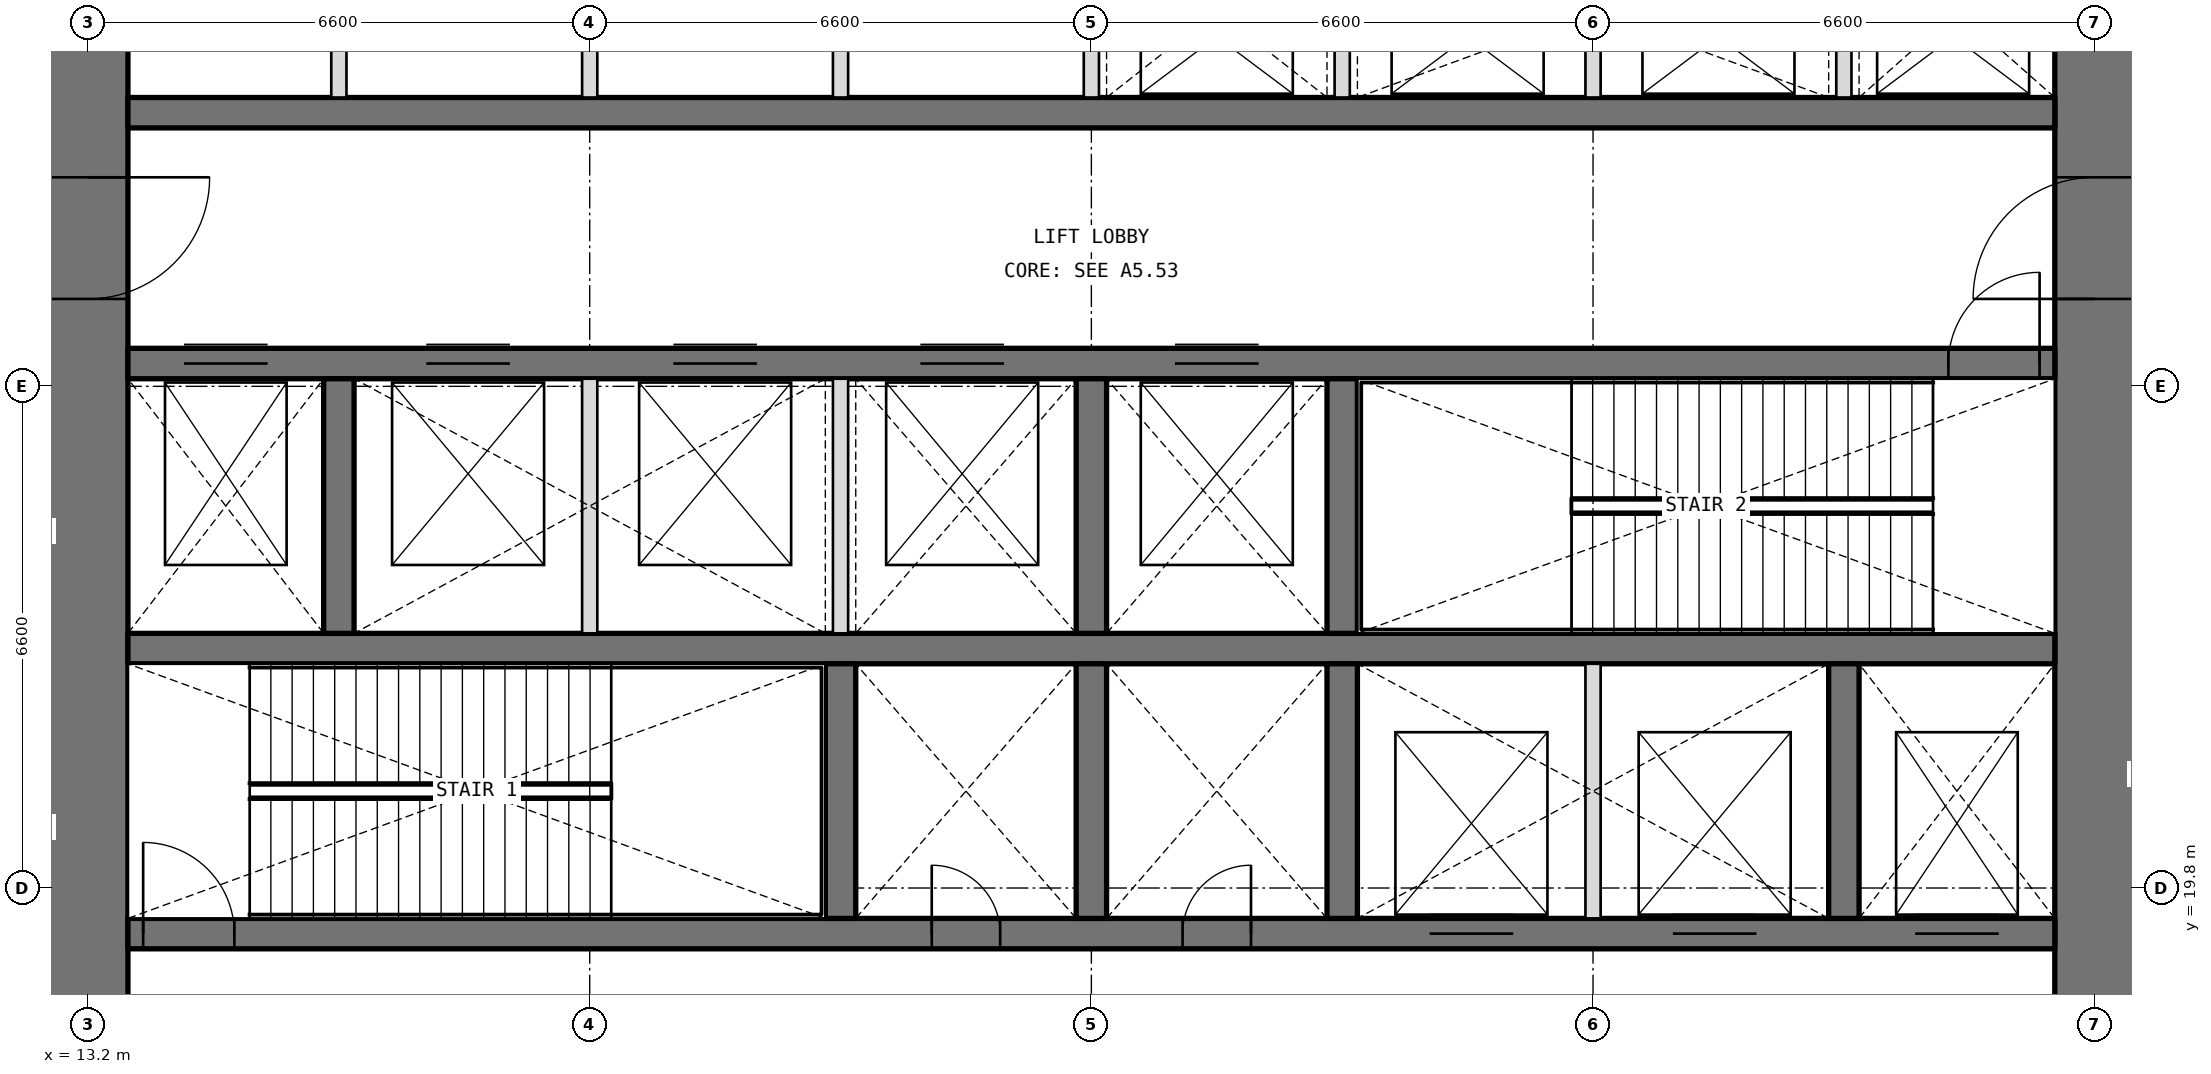
"""IFC4 building model, lengths in metres.
Left out: names, types, materials, properties, quantities, classifications, styles, units other than length and angle.
Written with IfcOpenShell. Run it as: python <this file> out.ifc"""

import sys

from ifc_helpers import new_model, si_unit, direction, frame, frame_2d, origin, place, context, subcontext, project, spatial, rectangle, extrude, element, fill, save


model = new_model("IFC4")
c1 = context("Model", 3, precision=1e-05, world=origin(), true_north=direction((0.0, 1.0)))
c2 = subcontext(c1, "Body", "Model", "MODEL_VIEW")
j1 = project(units=[si_unit("LENGTHUNIT", "METRE"), si_unit("PLANEANGLEUNIT", "RADIAN")], contexts=[c1])
p1 = place(None, origin())
s1 = spatial("IfcSite", under=j1, at=p1, CompositionType="ELEMENT")
p2 = place(p1, origin())
s2 = spatial("IfcBuilding", under=s1, at=p2, CompositionType="ELEMENT")
p3 = place(p2, frame((0.0, 0.0, 222.9)))
s3 = spatial("IfcBuildingStorey", under=s2, at=p3, CompositionType="ELEMENT", Elevation=222.9)
p4 = place(p3, frame((39.6, 13.725, 0.0), z_axis=(0.0, 0.0, 1.0), x_axis=(0.0, 1.0, 0.0)))
e1 = element("IfcWall", 1, at=p4, inside=s3, PredefinedType="SHEAR", context=c2, shape_type="SweptSolid", body=[
    extrude(rectangle(XDim=18.75, YDim=1.05, at=frame_2d((9.375, 0.0))), origin(), (0.0, 0.0, 1.0), 6.3),
])
p5 = place(p4, frame((3.025, 0.0, 0.0)))
e2 = element("IfcOpeningElement", 2, at=p5, cuts=e1, PredefinedType="OPENING", context=c2, shape_type="SweptSolid", body=[
    extrude(rectangle(XDim=1.6, YDim=2.1, at=frame_2d((0.8, 1.05))), frame((0.0, 0.535, 0.0), z_axis=(0.0, -1.0, 0.0), x_axis=(1.0, 0.0, 0.0)), (0.0, 0.0, 1.0), 1.07),
])
p6 = place(p4, frame((13.825, 0.0, 0.0)))
e3 = element("IfcOpeningElement", 3, at=p6, cuts=e1, PredefinedType="OPENING", context=c2, shape_type="SweptSolid", body=[
    extrude(rectangle(XDim=1.6, YDim=2.1, at=frame_2d((0.8, 1.05))), frame((0.0, 0.535, 0.0), z_axis=(0.0, -1.0, 0.0), x_axis=(1.0, 0.0, 0.0)), (0.0, 0.0, 1.0), 1.07),
])
p7 = place(p3, frame((13.2, 32.475, 0.0), z_axis=(0.0, 0.0, 1.0), x_axis=(0.0, -1.0, 0.0)))
e4 = element("IfcWall", 4, at=p7, inside=s3, PredefinedType="SHEAR", context=c2, shape_type="SweptSolid", body=[
    extrude(rectangle(XDim=18.75, YDim=1.05, at=frame_2d((9.375, 0.0))), origin(), (0.0, 0.0, 1.0), 6.3),
])
p8 = place(p7, frame((14.125, 0.0, 0.0)))
e5 = element("IfcOpeningElement", 5, at=p8, cuts=e4, PredefinedType="OPENING", context=c2, shape_type="SweptSolid", body=[
    extrude(rectangle(XDim=1.6, YDim=2.1, at=frame_2d((0.8, 1.05))), frame((0.0, 0.535, 0.0), z_axis=(0.0, -1.0, 0.0), x_axis=(1.0, 0.0, 0.0)), (0.0, 0.0, 1.0), 1.07),
])
p9 = place(p7, frame((3.325, 0.0, 0.0)))
e6 = element("IfcOpeningElement", 6, at=p9, cuts=e4, PredefinedType="OPENING", context=c2, shape_type="SweptSolid", body=[
    extrude(rectangle(XDim=1.6, YDim=2.1, at=frame_2d((0.8, 1.05))), frame((0.0, 0.535, 0.0), z_axis=(0.0, -1.0, 0.0), x_axis=(1.0, 0.0, 0.0)), (0.0, 0.0, 1.0), 1.07),
])
p10 = place(p3, frame((13.725, 19.2, 0.0), z_axis=(0.0, 0.0, 1.0), x_axis=(1.0, 0.0, 0.0)))
e7 = element("IfcWall", 7, at=p10, inside=s3, PredefinedType="SHEAR", context=c2, shape_type="SweptSolid", body=[
    extrude(rectangle(XDim=25.35, YDim=0.4, at=frame_2d((12.675, 0.0))), origin(), (0.0, 0.0, 1.0), 6.3),
])
p11 = place(p10, frame((10.575, 0.0, 0.0)))
e8 = element("IfcOpeningElement", 8, at=p11, cuts=e7, PredefinedType="OPENING", context=c2, shape_type="SweptSolid", body=[
    extrude(rectangle(XDim=0.9, YDim=2.1, at=frame_2d((0.45, 1.05))), frame((0.0, 0.21, 0.0), z_axis=(0.0, -1.0, 0.0), x_axis=(1.0, 0.0, 0.0)), (0.0, 0.0, 1.0), 0.42),
])
p12 = place(p10, frame((13.875, 0.0, 0.0)))
e9 = element("IfcOpeningElement", 9, at=p12, cuts=e7, PredefinedType="OPENING", context=c2, shape_type="SweptSolid", body=[
    extrude(rectangle(XDim=0.9, YDim=2.1, at=frame_2d((0.45, 1.05))), frame((0.0, 0.21, 0.0), z_axis=(0.0, -1.0, 0.0), x_axis=(1.0, 0.0, 0.0)), (0.0, 0.0, 1.0), 0.42),
])
p13 = place(p10, frame((0.2, 0.0, 0.0)))
e10 = element("IfcOpeningElement", 10, at=p13, cuts=e7, PredefinedType="OPENING", context=c2, shape_type="SweptSolid", body=[
    extrude(rectangle(XDim=1.2, YDim=2.1, at=frame_2d((0.6, 1.05))), frame((0.0, 0.21, 0.0), z_axis=(0.0, -1.0, 0.0), x_axis=(1.0, 0.0, 0.0)), (0.0, 0.0, 1.0), 0.42),
])
p14 = place(p10, frame((23.512, 0.0, 0.0)))
e11 = element("IfcOpeningElement", 11, at=p14, cuts=e7, PredefinedType="OPENING", context=c2, shape_type="SweptSolid", body=[
    extrude(rectangle(XDim=1.1, YDim=2.1, at=frame_2d((0.55, 1.05))), frame((0.0, 0.21, 0.0), z_axis=(0.0, -1.0, 0.0), x_axis=(1.0, 0.0, 0.0)), (0.0, 0.0, 1.0), 0.42),
])
p15 = place(p10, frame((17.125, 0.0, 0.0)))
e12 = element("IfcOpeningElement", 12, at=p15, cuts=e7, PredefinedType="OPENING", context=c2, shape_type="SweptSolid", body=[
    extrude(rectangle(XDim=1.1, YDim=2.1, at=frame_2d((0.55, 1.05))), frame((0.0, 0.21, 0.0), z_axis=(0.0, -1.0, 0.0), x_axis=(1.0, 0.0, 0.0)), (0.0, 0.0, 1.0), 0.42),
])
p16 = place(p10, frame((20.325, 0.0, 0.0)))
e13 = element("IfcOpeningElement", 13, at=p16, cuts=e7, PredefinedType="OPENING", context=c2, shape_type="SweptSolid", body=[
    extrude(rectangle(XDim=1.1, YDim=2.1, at=frame_2d((0.55, 1.05))), frame((0.0, 0.21, 0.0), z_axis=(0.0, -1.0, 0.0), x_axis=(1.0, 0.0, 0.0)), (0.0, 0.0, 1.0), 0.42),
])
p17 = place(p3, frame((13.725, 22.95, 0.0), z_axis=(0.0, 0.0, 1.0), x_axis=(1.0, 0.0, 0.0)))
e14 = element("IfcWall", 14, at=p17, inside=s3, PredefinedType="SHEAR", context=c2, shape_type="SweptSolid", body=[
    extrude(rectangle(XDim=25.35, YDim=0.4, at=frame_2d((12.675, 0.0))), origin(), (0.0, 0.0, 1.0), 6.3),
])
p18 = place(p3, frame((13.725, 26.7, 0.0), z_axis=(0.0, 0.0, 1.0), x_axis=(1.0, 0.0, 0.0)))
e15 = element("IfcWall", 15, at=p18, inside=s3, PredefinedType="SHEAR", context=c2, shape_type="SweptSolid", body=[
    extrude(rectangle(XDim=25.35, YDim=0.4, at=frame_2d((12.675, 0.0))), origin(), (0.0, 0.0, 1.0), 6.3),
])
p19 = place(p18, frame((23.95, 0.0, 0.0)))
e16 = element("IfcOpeningElement", 16, at=p19, cuts=e15, PredefinedType="OPENING", context=c2, shape_type="SweptSolid", body=[
    extrude(rectangle(XDim=1.2, YDim=2.1, at=frame_2d((0.6, 1.05))), frame((0.0, 0.21, 0.0), z_axis=(0.0, -1.0, 0.0), x_axis=(1.0, 0.0, 0.0)), (0.0, 0.0, 1.0), 0.42),
])
p20 = place(p18, frame((0.738, 0.0, 0.0)))
e17 = element("IfcOpeningElement", 17, at=p20, cuts=e15, PredefinedType="OPENING", context=c2, shape_type="SweptSolid", body=[
    extrude(rectangle(XDim=1.1, YDim=2.1, at=frame_2d((0.55, 1.05))), frame((0.0, 0.21, 0.0), z_axis=(0.0, -1.0, 0.0), x_axis=(1.0, 0.0, 0.0)), (0.0, 0.0, 1.0), 0.42),
])
p21 = place(p18, frame((3.925, 0.0, 0.0)))
e18 = element("IfcOpeningElement", 18, at=p21, cuts=e15, PredefinedType="OPENING", context=c2, shape_type="SweptSolid", body=[
    extrude(rectangle(XDim=1.1, YDim=2.1, at=frame_2d((0.55, 1.05))), frame((0.0, 0.21, 0.0), z_axis=(0.0, -1.0, 0.0), x_axis=(1.0, 0.0, 0.0)), (0.0, 0.0, 1.0), 0.42),
])
p22 = place(p18, frame((7.175, 0.0, 0.0)))
e19 = element("IfcOpeningElement", 19, at=p22, cuts=e15, PredefinedType="OPENING", context=c2, shape_type="SweptSolid", body=[
    extrude(rectangle(XDim=1.1, YDim=2.1, at=frame_2d((0.55, 1.05))), frame((0.0, 0.21, 0.0), z_axis=(0.0, -1.0, 0.0), x_axis=(1.0, 0.0, 0.0)), (0.0, 0.0, 1.0), 0.42),
])
p23 = place(p18, frame((10.425, 0.0, 0.0)))
e20 = element("IfcOpeningElement", 20, at=p23, cuts=e15, PredefinedType="OPENING", context=c2, shape_type="SweptSolid", body=[
    extrude(rectangle(XDim=1.1, YDim=2.1, at=frame_2d((0.55, 1.05))), frame((0.0, 0.21, 0.0), z_axis=(0.0, -1.0, 0.0), x_axis=(1.0, 0.0, 0.0)), (0.0, 0.0, 1.0), 0.42),
])
p24 = place(p18, frame((13.775, 0.0, 0.0)))
e21 = element("IfcOpeningElement", 21, at=p24, cuts=e15, PredefinedType="OPENING", context=c2, shape_type="SweptSolid", body=[
    extrude(rectangle(XDim=1.1, YDim=2.1, at=frame_2d((0.55, 1.05))), frame((0.0, 0.21, 0.0), z_axis=(0.0, -1.0, 0.0), x_axis=(1.0, 0.0, 0.0)), (0.0, 0.0, 1.0), 0.42),
])
p25 = place(p3, frame((13.725, 30.0, 0.0), z_axis=(0.0, 0.0, 1.0), x_axis=(1.0, 0.0, 0.0)))
e22 = element("IfcWall", 22, at=p25, inside=s3, PredefinedType="SHEAR", context=c2, shape_type="SweptSolid", body=[
    extrude(rectangle(XDim=25.35, YDim=0.4, at=frame_2d((12.675, 0.0))), origin(), (0.0, 0.0, 1.0), 6.3),
])
for number, where, z_axis, x_axis in (
    (23, (23.1, 19.4, 0.0), (0.0, 0.0, 1.0), (0.0, 1.0, 0.0)),
    (24, (26.4, 19.4, 0.0), (0.0, 0.0, 1.0), (0.0, 1.0, 0.0)),
    (25, (29.7, 19.4, 0.0), (0.0, 0.0, 1.0), (0.0, 1.0, 0.0)),
    (26, (36.3, 19.4, 0.0), (0.0, 0.0, 1.0), (0.0, 1.0, 0.0)),
    (27, (16.5, 23.15, 0.0), (0.0, 0.0, 1.0), (0.0, 1.0, 0.0)),
    (28, (26.4, 23.15, 0.0), (0.0, 0.0, 1.0), (0.0, 1.0, 0.0)),
    (29, (29.7, 23.15, 0.0), (0.0, 0.0, 1.0), (0.0, 1.0, 0.0)),
):
    element("IfcWall", number, at=place(p3, frame(where, z_axis=z_axis, x_axis=x_axis)), inside=s3, PredefinedType="SHEAR", context=c2, shape_type="SweptSolid", body=[
        extrude(rectangle(XDim=3.35, YDim=0.4, at=frame_2d((1.675, 0.0))), origin(), (0.0, 0.0, 1.0), 6.3),
    ])
for number, where, z_axis, x_axis in (
    (30, (16.5, 30.2, 0.0), (0.0, 0.0, 1.0), (0.0, 1.0, 0.0)),
    (31, (19.8, 30.2, 0.0), (0.0, 0.0, 1.0), (0.0, 1.0, 0.0)),
    (32, (23.1, 30.2, 0.0), (0.0, 0.0, 1.0), (0.0, 1.0, 0.0)),
    (33, (26.4, 30.2, 0.0), (0.0, 0.0, 1.0), (0.0, 1.0, 0.0)),
    (34, (29.7, 30.2, 0.0), (0.0, 0.0, 1.0), (0.0, 1.0, 0.0)),
    (35, (33.0, 30.2, 0.0), (0.0, 0.0, 1.0), (0.0, 1.0, 0.0)),
    (36, (36.3, 30.2, 0.0), (0.0, 0.0, 1.0), (0.0, 1.0, 0.0)),
):
    element("IfcWall", number, at=place(p3, frame(where, z_axis=z_axis, x_axis=x_axis)), inside=s3, PredefinedType="PARTITIONING", context=c2, shape_type="SweptSolid", body=[
        extrude(rectangle(XDim=2.275, YDim=0.2, at=frame_2d((1.138, 0.0))), origin(), (0.0, 0.0, 1.0), 6.3),
    ])
for number, where, z_axis, x_axis in (
    (37, (33.0, 19.4, 0.0), (0.0, 0.0, 1.0), (0.0, 1.0, 0.0)),
    (38, (19.8, 23.15, 0.0), (0.0, 0.0, 1.0), (0.0, 1.0, 0.0)),
    (39, (23.1, 23.15, 0.0), (0.0, 0.0, 1.0), (0.0, 1.0, 0.0)),
):
    element("IfcWall", number, at=place(p3, frame(where, z_axis=z_axis, x_axis=x_axis)), inside=s3, PredefinedType="PARTITIONING", context=c2, shape_type="SweptSolid", body=[
        extrude(rectangle(XDim=3.35, YDim=0.2, at=frame_2d((1.675, 0.0))), origin(), (0.0, 0.0, 1.0), 6.3),
    ])
p26 = place(p11, origin())
e40 = element("IfcDoor", 40, at=p26, inside=s3, OperationType="SINGLE_SWING_LEFT", PredefinedType="DOOR", context=c2, shape_type="SweptSolid", body=[
    extrude(rectangle(XDim=0.9, YDim=2.1, at=frame_2d((0.45, 1.05))), frame((0.0, 0.025, 0.0), z_axis=(0.0, -1.0, 0.0), x_axis=(1.0, 0.0, 0.0)), (0.0, 0.0, 1.0), 0.05),
])
fill(e8, e40)
p27 = place(p12, origin())
e41 = element("IfcDoor", 41, at=p27, inside=s3, OperationType="SINGLE_SWING_RIGHT", PredefinedType="DOOR", context=c2, shape_type="SweptSolid", body=[
    extrude(rectangle(XDim=0.9, YDim=2.1, at=frame_2d((0.45, 1.05))), frame((0.0, 0.025, 0.0), z_axis=(0.0, -1.0, 0.0), x_axis=(1.0, 0.0, 0.0)), (0.0, 0.0, 1.0), 0.05),
])
fill(e9, e41)
p28 = place(p13, origin())
e42 = element("IfcDoor", 42, at=p28, inside=s3, OperationType="SINGLE_SWING_LEFT", PredefinedType="DOOR", context=c2, shape_type="SweptSolid", body=[
    extrude(rectangle(XDim=1.2, YDim=2.1, at=frame_2d((0.6, 1.05))), frame((0.0, 0.025, 0.0), z_axis=(0.0, -1.0, 0.0), x_axis=(1.0, 0.0, 0.0)), (0.0, 0.0, 1.0), 0.05),
])
fill(e10, e42)
p29 = place(p19, origin())
e43 = element("IfcDoor", 43, at=p29, inside=s3, OperationType="SINGLE_SWING_RIGHT", PredefinedType="DOOR", context=c2, shape_type="SweptSolid", body=[
    extrude(rectangle(XDim=1.2, YDim=2.1, at=frame_2d((0.6, 1.05))), frame((0.0, 0.025, 0.0), z_axis=(0.0, -1.0, 0.0), x_axis=(1.0, 0.0, 0.0)), (0.0, 0.0, 1.0), 0.05),
])
fill(e16, e43)
p30 = place(p9, origin())
e44 = element("IfcDoor", 44, at=p30, inside=s3, OperationType="DOUBLE_DOOR_DOUBLE_SWING", PredefinedType="DOOR", context=c2, shape_type="SweptSolid", body=[
    extrude(rectangle(XDim=1.6, YDim=2.1, at=frame_2d((0.8, 1.05))), frame((0.0, 0.025, 0.0), z_axis=(0.0, -1.0, 0.0), x_axis=(1.0, 0.0, 0.0)), (0.0, 0.0, 1.0), 0.05),
])
fill(e6, e44)
p31 = place(p6, origin())
e45 = element("IfcDoor", 45, at=p31, inside=s3, OperationType="DOUBLE_DOOR_DOUBLE_SWING", PredefinedType="DOOR", context=c2, shape_type="SweptSolid", body=[
    extrude(rectangle(XDim=1.6, YDim=2.1, at=frame_2d((0.8, 1.05))), frame((0.0, 0.025, 0.0), z_axis=(0.0, -1.0, 0.0), x_axis=(1.0, 0.0, 0.0)), (0.0, 0.0, 1.0), 0.05),
])
fill(e3, e45)
p32 = place(p20, origin())
e46 = element("IfcDoor", 46, at=p32, inside=s3, OperationType="DOUBLE_DOOR_SLIDING", PredefinedType="DOOR", context=c2, shape_type="SweptSolid", body=[
    extrude(rectangle(XDim=1.1, YDim=2.1, at=frame_2d((0.55, 1.05))), frame((0.0, 0.025, 0.0), z_axis=(0.0, -1.0, 0.0), x_axis=(1.0, 0.0, 0.0)), (0.0, 0.0, 1.0), 0.05),
])
fill(e17, e46)
p33 = place(p14, origin())
e47 = element("IfcDoor", 47, at=p33, inside=s3, OperationType="DOUBLE_DOOR_SLIDING", PredefinedType="DOOR", context=c2, shape_type="SweptSolid", body=[
    extrude(rectangle(XDim=1.1, YDim=2.1, at=frame_2d((0.55, 1.05))), frame((0.0, 0.025, 0.0), z_axis=(0.0, -1.0, 0.0), x_axis=(1.0, 0.0, 0.0)), (0.0, 0.0, 1.0), 0.05),
])
fill(e11, e47)
p34 = place(p15, origin())
e48 = element("IfcDoor", 48, at=p34, inside=s3, OperationType="DOUBLE_DOOR_SLIDING", PredefinedType="DOOR", context=c2, shape_type="SweptSolid", body=[
    extrude(rectangle(XDim=1.1, YDim=2.1, at=frame_2d((0.55, 1.05))), frame((0.0, 0.025, 0.0), z_axis=(0.0, -1.0, 0.0), x_axis=(1.0, 0.0, 0.0)), (0.0, 0.0, 1.0), 0.05),
])
fill(e12, e48)
p35 = place(p16, origin())
e49 = element("IfcDoor", 49, at=p35, inside=s3, OperationType="DOUBLE_DOOR_SLIDING", PredefinedType="DOOR", context=c2, shape_type="SweptSolid", body=[
    extrude(rectangle(XDim=1.1, YDim=2.1, at=frame_2d((0.55, 1.05))), frame((0.0, 0.025, 0.0), z_axis=(0.0, -1.0, 0.0), x_axis=(1.0, 0.0, 0.0)), (0.0, 0.0, 1.0), 0.05),
])
fill(e13, e49)
p36 = place(p21, origin())
e50 = element("IfcDoor", 50, at=p36, inside=s3, OperationType="DOUBLE_DOOR_SLIDING", PredefinedType="DOOR", context=c2, shape_type="SweptSolid", body=[
    extrude(rectangle(XDim=1.1, YDim=2.1, at=frame_2d((0.55, 1.05))), frame((0.0, 0.025, 0.0), z_axis=(0.0, -1.0, 0.0), x_axis=(1.0, 0.0, 0.0)), (0.0, 0.0, 1.0), 0.05),
])
fill(e18, e50)
p37 = place(p22, origin())
e51 = element("IfcDoor", 51, at=p37, inside=s3, OperationType="DOUBLE_DOOR_SLIDING", PredefinedType="DOOR", context=c2, shape_type="SweptSolid", body=[
    extrude(rectangle(XDim=1.1, YDim=2.1, at=frame_2d((0.55, 1.05))), frame((0.0, 0.025, 0.0), z_axis=(0.0, -1.0, 0.0), x_axis=(1.0, 0.0, 0.0)), (0.0, 0.0, 1.0), 0.05),
])
fill(e19, e51)
p38 = place(p23, origin())
e52 = element("IfcDoor", 52, at=p38, inside=s3, OperationType="DOUBLE_DOOR_SLIDING", PredefinedType="DOOR", context=c2, shape_type="SweptSolid", body=[
    extrude(rectangle(XDim=1.1, YDim=2.1, at=frame_2d((0.55, 1.05))), frame((0.0, 0.025, 0.0), z_axis=(0.0, -1.0, 0.0), x_axis=(1.0, 0.0, 0.0)), (0.0, 0.0, 1.0), 0.05),
])
fill(e20, e52)
p39 = place(p24, origin())
e53 = element("IfcDoor", 53, at=p39, inside=s3, OperationType="DOUBLE_DOOR_SLIDING", PredefinedType="DOOR", context=c2, shape_type="SweptSolid", body=[
    extrude(rectangle(XDim=1.1, YDim=2.1, at=frame_2d((0.55, 1.05))), frame((0.0, 0.025, 0.0), z_axis=(0.0, -1.0, 0.0), x_axis=(1.0, 0.0, 0.0)), (0.0, 0.0, 1.0), 0.05),
])
fill(e21, e53)
save(model, sys.argv[1])
